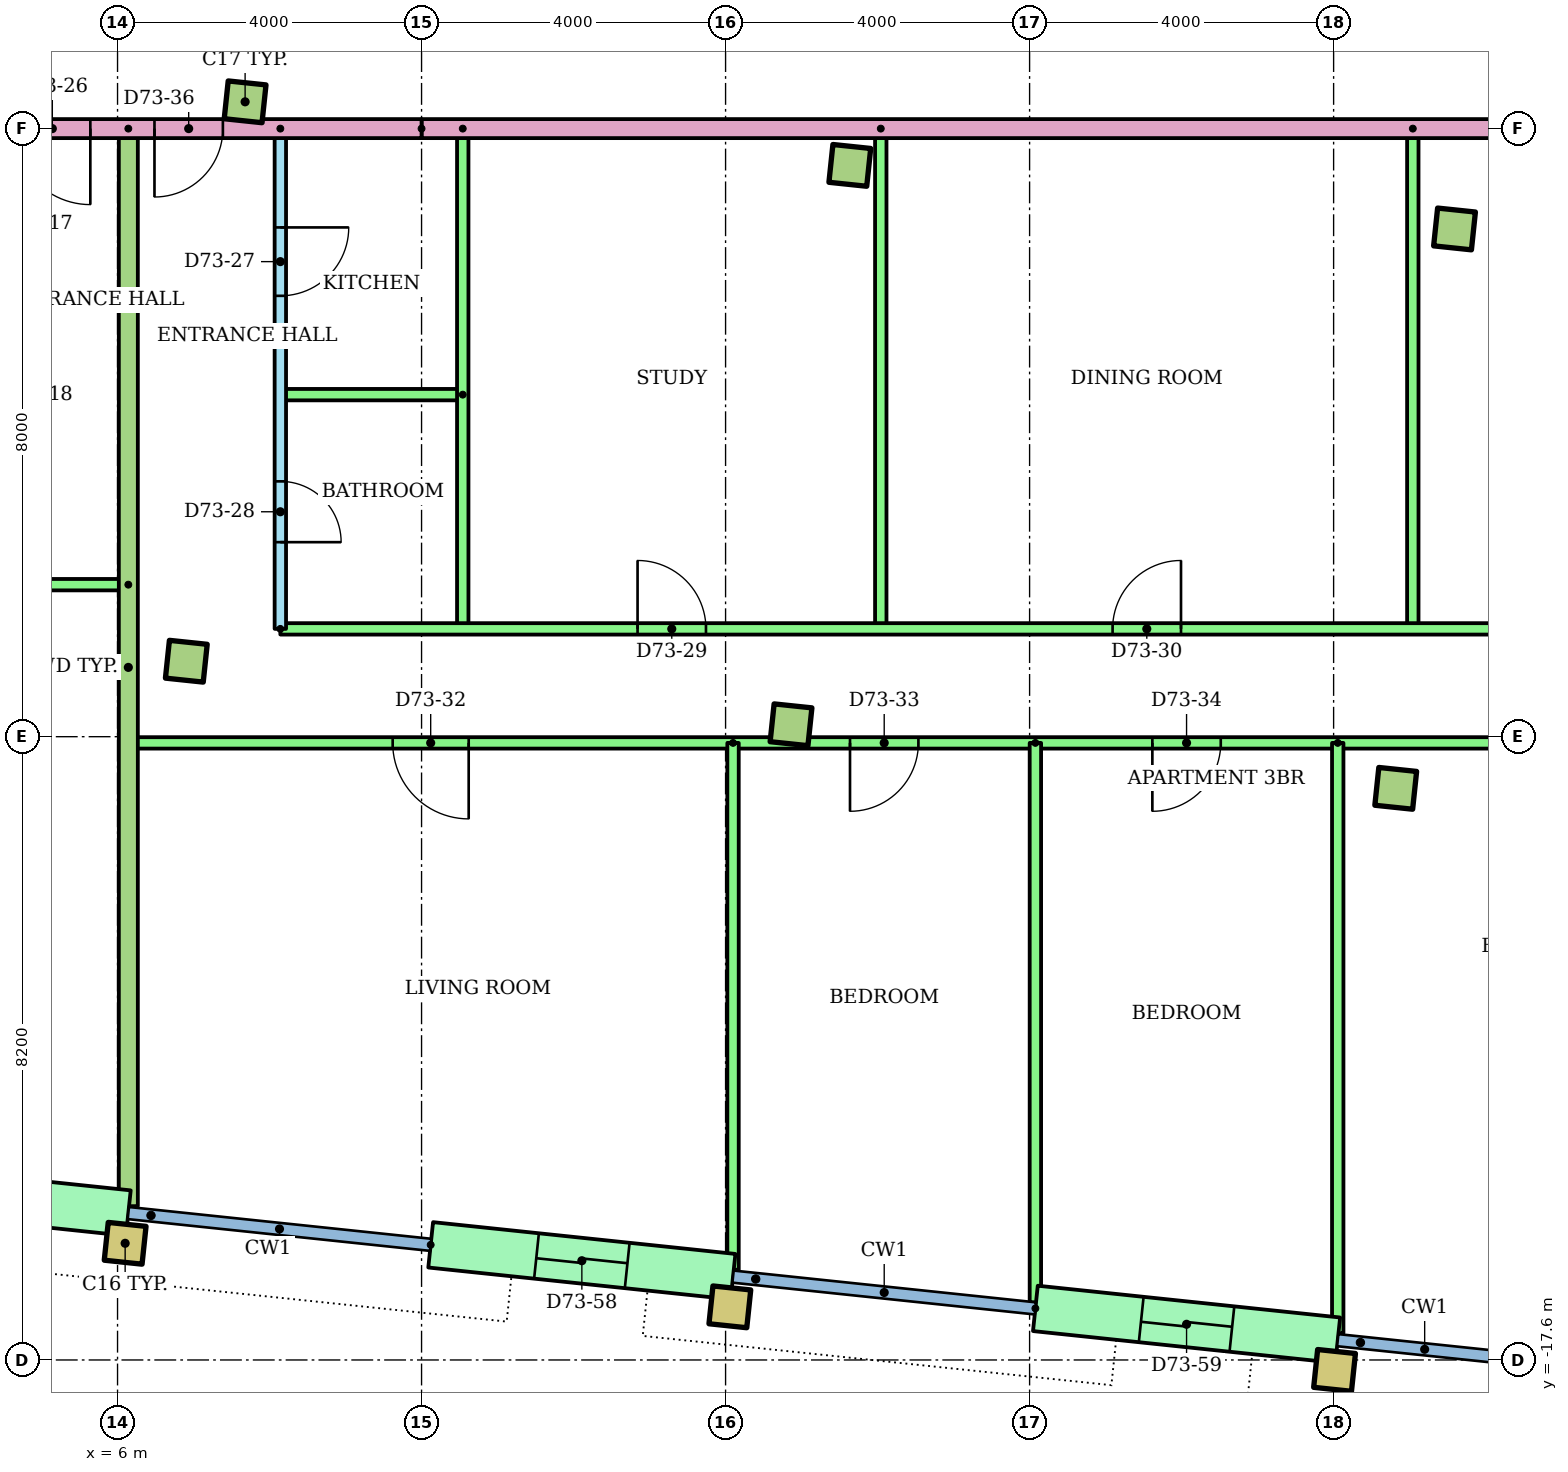
"""IFC4 building model, lengths in metres.
Left out: names, types, materials, properties, quantities, classifications, styles, units other than length and angle.
Written with IfcOpenShell. Run it as: python <this file> out.ifc"""

import sys

from ifc_helpers import new_model, si_unit, direction, frame, frame_2d, origin, origin_2d, place, context, subcontext, project, spatial, rectangle, hollow_rectangle, extrude, element, fill, save


model = new_model("IFC4")
c1 = context("Model", 3, precision=1e-05, world=origin(), true_north=direction((0.0, 1.0)))
c2 = subcontext(c1, "Body", "Model", "MODEL_VIEW")
j1 = project(units=[si_unit("LENGTHUNIT", "METRE"), si_unit("PLANEANGLEUNIT", "RADIAN")], contexts=[c1])
p1 = place(None, origin())
s1 = spatial("IfcSite", under=j1, at=p1, CompositionType="ELEMENT")
p2 = place(p1, origin())
s2 = spatial("IfcBuilding", under=s1, at=p2, CompositionType="ELEMENT")
p3 = place(p2, frame((0.0, 0.0, 278.7)))
s3 = spatial("IfcBuildingStorey", under=s2, at=p3, CompositionType="ELEMENT", Elevation=278.7)
for number, where, z_axis, x_axis in (
    (1, (6.1, -16.065, 0.0), (0.0, 0.0, 1.0), (0.995, -0.105, 0.0)),
    (2, (14.056, -16.901, 0.0), (0.0, 0.0, 1.0), (0.995, -0.105, 0.0)),
    (3, (22.012, -17.737, 0.0), (0.0, 0.0, 1.0), (0.995, -0.105, 0.0)),
):
    element("IfcColumn", number, at=place(p3, frame(where, z_axis=z_axis, x_axis=x_axis)), inside=s3, PredefinedType="COLUMN", context=c2, shape_type="SweptSolid", body=[
        extrude(hollow_rectangle(XDim=0.5, YDim=0.5, WallThickness=0.025, at=origin_2d()), origin(), (0.0, 0.0, 1.0), 3.2),
    ])
for number, where, z_axis, x_axis in (
    (4, (6.905, -8.407, 0.0), (0.0, 0.0, 1.0), (0.995, -0.105, 0.0)),
    (5, (14.861, -9.243, 0.0), (0.0, 0.0, 1.0), (0.995, -0.105, 0.0)),
    (6, (22.817, -10.08, 0.0), (0.0, 0.0, 1.0), (0.995, -0.105, 0.0)),
    (7, (7.678, -1.048, 0.0), (0.0, 0.0, 1.0), (0.995, -0.105, 0.0)),
    (8, (15.635, -1.884, 0.0), (0.0, 0.0, 1.0), (0.995, -0.105, 0.0)),
    (9, (23.591, -2.72, 0.0), (0.0, 0.0, 1.0), (0.995, -0.105, 0.0)),
):
    element("IfcColumn", number, at=place(p3, frame(where, z_axis=z_axis, x_axis=x_axis)), inside=s3, PredefinedType="COLUMN", context=c2, shape_type="SweptSolid", body=[
        extrude(rectangle(XDim=0.5, YDim=0.5, at=origin_2d()), origin(), (0.0, 0.0, 1.0), 3.2),
    ])
p4 = place(p3, frame((2.164, -15.249, 0.0), z_axis=(0.0, 0.0, 1.0), x_axis=(0.99452550138, -0.104494148666, 0.0)))
e10 = element("IfcWall", 10, at=p4, inside=s3, PredefinedType="STANDARD", context=c2, shape_type="SweptSolid", body=[
    extrude(rectangle(XDim=4.0, YDim=0.6, at=frame_2d((2.0, 0.0))), origin(), (0.0, 0.0, 1.0), 2.8),
])
p5 = place(p4, frame((1.4, 0.0, 0.0)))
e11 = element("IfcOpeningElement", 11, at=p5, cuts=e10, PredefinedType="OPENING", context=c2, shape_type="SweptSolid", body=[
    extrude(rectangle(XDim=1.2, YDim=2.1, at=frame_2d((0.6, 1.05))), frame((0.0, 0.31, 0.0), z_axis=(0.0, -1.0, 0.0), x_axis=(1.0, 0.0, 0.0)), (0.0, 0.0, 1.0), 0.62),
])
p6 = place(p3, frame((10.12, -16.085, 0.0), z_axis=(0.0, 0.0, 1.0), x_axis=(0.994519156568, -0.104554517933, 0.0)))
e12 = element("IfcWall", 12, at=p6, inside=s3, PredefinedType="STANDARD", context=c2, shape_type="SweptSolid", body=[
    extrude(rectangle(XDim=4.0, YDim=0.6, at=frame_2d((2.0, 0.0))), origin(), (0.0, 0.0, 1.0), 2.8),
])
p7 = place(p6, frame((1.4, 0.0, 0.0)))
e13 = element("IfcOpeningElement", 13, at=p7, cuts=e12, PredefinedType="OPENING", context=c2, shape_type="SweptSolid", body=[
    extrude(rectangle(XDim=1.2, YDim=2.1, at=frame_2d((0.6, 1.05))), frame((0.0, 0.31, 0.0), z_axis=(0.0, -1.0, 0.0), x_axis=(1.0, 0.0, 0.0)), (0.0, 0.0, 1.0), 0.62),
])
p8 = place(p3, frame((18.076, -16.921, 0.0), z_axis=(0.0, 0.0, 1.0), x_axis=(0.994519156568, -0.104554517933, 0.0)))
e14 = element("IfcWall", 14, at=p8, inside=s3, PredefinedType="STANDARD", context=c2, shape_type="SweptSolid", body=[
    extrude(rectangle(XDim=4.0, YDim=0.6, at=frame_2d((2.0, 0.0))), origin(), (0.0, 0.0, 1.0), 2.8),
])
p9 = place(p8, frame((1.4, 0.0, 0.0)))
e15 = element("IfcOpeningElement", 15, at=p9, cuts=e14, PredefinedType="OPENING", context=c2, shape_type="SweptSolid", body=[
    extrude(rectangle(XDim=1.2, YDim=2.1, at=frame_2d((0.6, 1.05))), frame((0.0, 0.31, 0.0), z_axis=(0.0, -1.0, 0.0), x_axis=(1.0, 0.0, 0.0)), (0.0, 0.0, 1.0), 0.62),
])
p10 = place(p3, frame((6.142, -7.4, 0.0), z_axis=(0.0, 0.0, 1.0), x_axis=(-1.0, 0.0, 0.0)))
e16 = element("IfcWall", 16, at=p10, inside=s3, PredefinedType="PARTITIONING", context=c2, shape_type="SweptSolid", body=[
    extrude(rectangle(XDim=15.912, YDim=0.15, at=frame_2d((7.956, 0.0))), origin(), (0.0, 0.0, 1.0), 2.4),
])
p11 = place(p10, frame((12.252, 0.0, 0.0)))
e17 = element("IfcOpeningElement", 17, at=p11, cuts=e16, PredefinedType="OPENING", context=c2, shape_type="SweptSolid", body=[
    extrude(rectangle(XDim=0.9, YDim=2.1, at=frame_2d((0.45, 1.05))), frame((0.0, 0.085, 0.0), z_axis=(0.0, -1.0, 0.0), x_axis=(1.0, 0.0, 0.0)), (0.0, 0.0, 1.0), 0.17),
])
p12 = place(p10, frame((9.495, 0.0, 0.0)))
e18 = element("IfcOpeningElement", 18, at=p12, cuts=e16, PredefinedType="OPENING", context=c2, shape_type="SweptSolid", body=[
    extrude(rectangle(XDim=0.9, YDim=2.1, at=frame_2d((0.45, 1.05))), frame((0.0, 0.085, 0.0), z_axis=(0.0, -1.0, 0.0), x_axis=(1.0, 0.0, 0.0)), (0.0, 0.0, 1.0), 0.17),
])
p13 = place(p10, frame((3.478, 0.0, 0.0)))
e19 = element("IfcOpeningElement", 19, at=p13, cuts=e16, PredefinedType="OPENING", context=c2, shape_type="SweptSolid", body=[
    extrude(rectangle(XDim=1.0, YDim=2.1, at=frame_2d((0.5, 1.05))), frame((0.0, 0.085, 0.0), z_axis=(0.0, -1.0, 0.0), x_axis=(1.0, 0.0, 0.0)), (0.0, 0.0, 1.0), 0.17),
])
p14 = place(p3, frame((8.142, -1.4, 0.0), z_axis=(0.0, 0.0, 1.0), x_axis=(0.0, -1.0, 0.0)))
e20 = element("IfcWall", 20, at=p14, inside=s3, PredefinedType="PARTITIONING", context=c2, shape_type="SweptSolid", body=[
    extrude(rectangle(XDim=6.582, YDim=0.15, at=frame_2d((3.291, 0.0))), origin(), (0.0, 0.0, 1.0), 2.4),
])
p15 = place(p14, frame((1.3, 0.0, 0.0)))
e21 = element("IfcOpeningElement", 21, at=p15, cuts=e20, PredefinedType="OPENING", context=c2, shape_type="SweptSolid", body=[
    extrude(rectangle(XDim=0.9, YDim=2.1, at=frame_2d((0.45, 1.05))), frame((0.0, 0.085, 0.0), z_axis=(0.0, -1.0, 0.0), x_axis=(1.0, 0.0, 0.0)), (0.0, 0.0, 1.0), 0.17),
])
p16 = place(p14, frame((4.641, 0.0, 0.0)))
e22 = element("IfcOpeningElement", 22, at=p16, cuts=e20, PredefinedType="OPENING", context=c2, shape_type="SweptSolid", body=[
    extrude(rectangle(XDim=0.8, YDim=2.1, at=frame_2d((0.4, 1.05))), frame((0.0, 0.085, 0.0), z_axis=(0.0, -1.0, 0.0), x_axis=(1.0, 0.0, 0.0)), (0.0, 0.0, 1.0), 0.17),
])
p17 = place(p3, frame((10.542, -4.9, 0.0), z_axis=(0.0, 0.0, 1.0), x_axis=(-1.0, 0.0, 0.0)))
e23 = element("IfcWall", 23, at=p17, inside=s3, PredefinedType="PARTITIONING", context=c2, shape_type="SweptSolid", body=[
    extrude(rectangle(XDim=2.4, YDim=0.15, at=frame_2d((1.2, 0.0))), origin(), (0.0, 0.0, 1.0), 2.4),
])
for number, where, z_axis, x_axis in (
    (24, (10.542, -1.4, 0.0), (0.0, 0.0, 1.0), (0.0, -1.0, 0.0)),
    (25, (16.042, -1.4, 0.0), (0.0, 0.0, 1.0), (0.0, -1.0, 0.0)),
    (26, (23.042, -1.4, 0.0), (0.0, 0.0, 1.0), (0.0, -1.0, 0.0)),
):
    element("IfcWall", number, at=place(p3, frame(where, z_axis=z_axis, x_axis=x_axis)), inside=s3, PredefinedType="PARTITIONING", context=c2, shape_type="SweptSolid", body=[
        extrude(rectangle(XDim=6.582, YDim=0.15, at=frame_2d((3.291, 0.0))), origin(), (0.0, 0.0, 1.0), 2.4),
    ])
p18 = place(p3, frame((8.142, -7.982, 0.0)))
e27 = element("IfcWall", 27, at=p18, inside=s3, PredefinedType="PARTITIONING", context=c2, shape_type="SweptSolid", body=[
    extrude(rectangle(XDim=21.955, YDim=0.15, at=frame_2d((10.978, 0.0))), origin(), (0.0, 0.0, 1.0), 2.4),
])
p19 = place(p18, frame((4.7, 0.0, 0.0)))
e28 = element("IfcOpeningElement", 28, at=p19, cuts=e27, PredefinedType="OPENING", context=c2, shape_type="SweptSolid", body=[
    extrude(rectangle(XDim=0.9, YDim=2.1, at=frame_2d((0.45, 1.05))), frame((0.0, 0.085, 0.0), z_axis=(0.0, -1.0, 0.0), x_axis=(1.0, 0.0, 0.0)), (0.0, 0.0, 1.0), 0.17),
])
p20 = place(p18, frame((10.95, 0.0, 0.0)))
e29 = element("IfcOpeningElement", 29, at=p20, cuts=e27, PredefinedType="OPENING", context=c2, shape_type="SweptSolid", body=[
    extrude(rectangle(XDim=0.9, YDim=2.1, at=frame_2d((0.45, 1.05))), frame((0.0, 0.085, 0.0), z_axis=(0.0, -1.0, 0.0), x_axis=(1.0, 0.0, 0.0)), (0.0, 0.0, 1.0), 0.17),
])
p21 = place(p18, frame((18.958, 0.0, 0.0)))
e30 = element("IfcOpeningElement", 30, at=p21, cuts=e27, PredefinedType="OPENING", context=c2, shape_type="SweptSolid", body=[
    extrude(rectangle(XDim=0.9, YDim=2.1, at=frame_2d((0.45, 1.05))), frame((0.0, 0.085, 0.0), z_axis=(0.0, -1.0, 0.0), x_axis=(1.0, 0.0, 0.0)), (0.0, 0.0, 1.0), 0.17),
])
p22 = place(p3, frame((29.94, -9.482, 0.0), z_axis=(0.0, 0.0, 1.0), x_axis=(-1.0, 0.0, 0.0)))
e31 = element("IfcWall", 31, at=p22, inside=s3, PredefinedType="PARTITIONING", context=c2, shape_type="SweptSolid", body=[
    extrude(rectangle(XDim=23.798, YDim=0.15, at=frame_2d((11.899, 0.0))), origin(), (0.0, 0.0, 1.0), 2.4),
])
p23 = place(p22, frame((19.32, 0.0, 0.0)))
e32 = element("IfcOpeningElement", 32, at=p23, cuts=e31, PredefinedType="OPENING", context=c2, shape_type="SweptSolid", body=[
    extrude(rectangle(XDim=1.0, YDim=2.1, at=frame_2d((0.5, 1.05))), frame((0.0, 0.085, 0.0), z_axis=(0.0, -1.0, 0.0), x_axis=(1.0, 0.0, 0.0)), (0.0, 0.0, 1.0), 0.17),
])
p24 = place(p22, frame((13.403, 0.0, 0.0)))
e33 = element("IfcOpeningElement", 33, at=p24, cuts=e31, PredefinedType="OPENING", context=c2, shape_type="SweptSolid", body=[
    extrude(rectangle(XDim=0.9, YDim=2.1, at=frame_2d((0.45, 1.05))), frame((0.0, 0.085, 0.0), z_axis=(0.0, -1.0, 0.0), x_axis=(1.0, 0.0, 0.0)), (0.0, 0.0, 1.0), 0.17),
])
p25 = place(p22, frame((9.425, 0.0, 0.0)))
e34 = element("IfcOpeningElement", 34, at=p25, cuts=e31, PredefinedType="OPENING", context=c2, shape_type="SweptSolid", body=[
    extrude(rectangle(XDim=0.9, YDim=2.1, at=frame_2d((0.45, 1.05))), frame((0.0, 0.085, 0.0), z_axis=(0.0, -1.0, 0.0), x_axis=(1.0, 0.0, 0.0)), (0.0, 0.0, 1.0), 0.17),
])
p26 = place(p22, frame((2.434, 0.0, 0.0)))
e35 = element("IfcOpeningElement", 35, at=p26, cuts=e31, PredefinedType="OPENING", context=c2, shape_type="SweptSolid", body=[
    extrude(rectangle(XDim=0.9, YDim=2.1, at=frame_2d((0.45, 1.05))), frame((0.0, 0.085, 0.0), z_axis=(0.0, -1.0, 0.0), x_axis=(1.0, 0.0, 0.0)), (0.0, 0.0, 1.0), 0.17),
])
p27 = place(p3, frame((14.098, -9.482, 0.0), z_axis=(0.0, 0.0, 1.0), x_axis=(0.0, -1.0, 0.0)))
e36 = element("IfcWall", 36, at=p27, inside=s3, PredefinedType="PARTITIONING", context=c2, shape_type="SweptSolid", body=[
    extrude(rectangle(XDim=6.931, YDim=0.15, at=frame_2d((3.466, 0.0))), origin(), (0.0, 0.0, 1.0), 2.4),
])
p28 = place(p3, frame((18.076, -9.482, 0.0), z_axis=(0.0, 0.0, 1.0), x_axis=(0.0, -1.0, 0.0)))
e37 = element("IfcWall", 37, at=p28, inside=s3, PredefinedType="PARTITIONING", context=c2, shape_type="SweptSolid", body=[
    extrude(rectangle(XDim=7.36, YDim=0.15, at=frame_2d((3.68, 0.0))), origin(), (0.0, 0.0, 1.0), 2.4),
])
p29 = place(p3, frame((22.054, -9.482, 0.0), z_axis=(0.0, 0.0, 1.0), x_axis=(0.0, -1.0, 0.0)))
e38 = element("IfcWall", 38, at=p29, inside=s3, PredefinedType="PARTITIONING", context=c2, shape_type="SweptSolid", body=[
    extrude(rectangle(XDim=7.767, YDim=0.15, at=frame_2d((3.884, 0.0))), origin(), (0.0, 0.0, 1.0), 2.4),
])
p30 = place(p3, frame((6.142, -1.4, 0.0), z_axis=(0.0, 0.0, 1.0), x_axis=(0.0, -1.0, 0.0)))
e39 = element("IfcWall", 39, at=p30, inside=s3, PredefinedType="PARTITIONING", context=c2, shape_type="SweptSolid", body=[
    extrude(rectangle(XDim=14.177, YDim=0.25, at=frame_2d((7.088, 0.0))), origin(), (0.0, 0.0, 1.0), 2.4),
])
p31 = place(p3, frame((25.0, -1.4, 0.0), z_axis=(0.0, 0.0, 1.0), x_axis=(-1.0, 0.0, 0.0)))
e40 = element("IfcWall", 40, at=p31, inside=s3, PredefinedType="PARTITIONING", context=c2, shape_type="SweptSolid", body=[
    extrude(rectangle(XDim=15.0, YDim=0.25, at=frame_2d((7.5, 0.0))), origin(), (0.0, 0.0, 1.0), 2.4),
])
p32 = place(p3, frame((10.0, -1.4, 0.0), z_axis=(0.0, 0.0, 1.0), x_axis=(-1.0, 0.0, 0.0)))
e41 = element("IfcWall", 41, at=p32, inside=s3, PredefinedType="PARTITIONING", context=c2, shape_type="SweptSolid", body=[
    extrude(rectangle(XDim=20.0, YDim=0.25, at=frame_2d((10.0, 0.0))), origin(), (0.0, 0.0, 1.0), 2.4),
])
p33 = place(p32, frame((4.358, 0.0, 0.0)))
e42 = element("IfcOpeningElement", 42, at=p33, cuts=e41, PredefinedType="OPENING", context=c2, shape_type="SweptSolid", body=[
    extrude(rectangle(XDim=1.0, YDim=2.1, at=frame_2d((0.5, 1.05))), frame((0.0, 0.135, 0.0), z_axis=(0.0, -1.0, 0.0), x_axis=(1.0, 0.0, 0.0)), (0.0, 0.0, 1.0), 0.27),
])
p34 = place(p32, frame((2.614, 0.0, 0.0)))
e43 = element("IfcOpeningElement", 43, at=p34, cuts=e41, PredefinedType="OPENING", context=c2, shape_type="SweptSolid", body=[
    extrude(rectangle(XDim=0.9, YDim=2.1, at=frame_2d((0.45, 1.05))), frame((0.0, 0.135, 0.0), z_axis=(0.0, -1.0, 0.0), x_axis=(1.0, 0.0, 0.0)), (0.0, 0.0, 1.0), 0.27),
])
p35 = place(p33, origin())
e44 = element("IfcDoor", 44, at=p35, inside=s3, OperationType="SINGLE_SWING_LEFT", PredefinedType="DOOR", context=c2, shape_type="SweptSolid", body=[
    extrude(rectangle(XDim=1.0, YDim=2.1, at=frame_2d((0.5, 1.05))), frame((0.0, 0.025, 0.0), z_axis=(0.0, -1.0, 0.0), x_axis=(1.0, 0.0, 0.0)), (0.0, 0.0, 1.0), 0.05),
])
fill(e42, e44)
p36 = place(p15, origin())
e45 = element("IfcDoor", 45, at=p36, inside=s3, OperationType="SINGLE_SWING_LEFT", PredefinedType="DOOR", context=c2, shape_type="SweptSolid", body=[
    extrude(rectangle(XDim=0.9, YDim=2.1, at=frame_2d((0.45, 1.05))), frame((0.0, 0.025, 0.0), z_axis=(0.0, -1.0, 0.0), x_axis=(1.0, 0.0, 0.0)), (0.0, 0.0, 1.0), 0.05),
])
fill(e21, e45)
p37 = place(p16, origin())
e46 = element("IfcDoor", 46, at=p37, inside=s3, OperationType="SINGLE_SWING_RIGHT", PredefinedType="DOOR", context=c2, shape_type="SweptSolid", body=[
    extrude(rectangle(XDim=0.8, YDim=2.1, at=frame_2d((0.4, 1.05))), frame((0.0, 0.025, 0.0), z_axis=(0.0, -1.0, 0.0), x_axis=(1.0, 0.0, 0.0)), (0.0, 0.0, 1.0), 0.05),
])
fill(e22, e46)
p38 = place(p19, origin())
e47 = element("IfcDoor", 47, at=p38, inside=s3, OperationType="SINGLE_SWING_LEFT", PredefinedType="DOOR", context=c2, shape_type="SweptSolid", body=[
    extrude(rectangle(XDim=0.9, YDim=2.1, at=frame_2d((0.45, 1.05))), frame((0.0, 0.025, 0.0), z_axis=(0.0, -1.0, 0.0), x_axis=(1.0, 0.0, 0.0)), (0.0, 0.0, 1.0), 0.05),
])
fill(e28, e47)
p39 = place(p20, origin())
e48 = element("IfcDoor", 48, at=p39, inside=s3, OperationType="SINGLE_SWING_RIGHT", PredefinedType="DOOR", context=c2, shape_type="SweptSolid", body=[
    extrude(rectangle(XDim=0.9, YDim=2.1, at=frame_2d((0.45, 1.05))), frame((0.0, 0.025, 0.0), z_axis=(0.0, -1.0, 0.0), x_axis=(1.0, 0.0, 0.0)), (0.0, 0.0, 1.0), 0.05),
])
fill(e29, e48)
p40 = place(p23, origin())
e49 = element("IfcDoor", 49, at=p40, inside=s3, OperationType="SINGLE_SWING_LEFT", PredefinedType="DOOR", context=c2, shape_type="SweptSolid", body=[
    extrude(rectangle(XDim=1.0, YDim=2.1, at=frame_2d((0.5, 1.05))), frame((0.0, 0.025, 0.0), z_axis=(0.0, -1.0, 0.0), x_axis=(1.0, 0.0, 0.0)), (0.0, 0.0, 1.0), 0.05),
])
fill(e32, e49)
p41 = place(p24, origin())
e50 = element("IfcDoor", 50, at=p41, inside=s3, OperationType="SINGLE_SWING_RIGHT", PredefinedType="DOOR", context=c2, shape_type="SweptSolid", body=[
    extrude(rectangle(XDim=0.9, YDim=2.1, at=frame_2d((0.45, 1.05))), frame((0.0, 0.025, 0.0), z_axis=(0.0, -1.0, 0.0), x_axis=(1.0, 0.0, 0.0)), (0.0, 0.0, 1.0), 0.05),
])
fill(e33, e50)
p42 = place(p25, origin())
e51 = element("IfcDoor", 51, at=p42, inside=s3, OperationType="SINGLE_SWING_RIGHT", PredefinedType="DOOR", context=c2, shape_type="SweptSolid", body=[
    extrude(rectangle(XDim=0.9, YDim=2.1, at=frame_2d((0.45, 1.05))), frame((0.0, 0.025, 0.0), z_axis=(0.0, -1.0, 0.0), x_axis=(1.0, 0.0, 0.0)), (0.0, 0.0, 1.0), 0.05),
])
fill(e34, e51)
p43 = place(p34, origin())
e52 = element("IfcDoor", 52, at=p43, inside=s3, OperationType="SINGLE_SWING_RIGHT", PredefinedType="DOOR", context=c2, shape_type="SweptSolid", body=[
    extrude(rectangle(XDim=0.9, YDim=2.1, at=frame_2d((0.45, 1.05))), frame((0.0, 0.025, 0.0), z_axis=(0.0, -1.0, 0.0), x_axis=(1.0, 0.0, 0.0)), (0.0, 0.0, 1.0), 0.05),
])
fill(e43, e52)
p44 = place(p7, origin())
e53 = element("IfcDoor", 53, at=p44, inside=s3, OperationType="SLIDING_TO_LEFT", PredefinedType="DOOR", context=c2, shape_type="SweptSolid", body=[
    extrude(rectangle(XDim=1.2, YDim=2.1, at=frame_2d((0.6, 1.05))), frame((0.0, 0.025, 0.0), z_axis=(0.0, -1.0, 0.0), x_axis=(1.0, 0.0, 0.0)), (0.0, 0.0, 1.0), 0.05),
])
fill(e13, e53)
p45 = place(p9, origin())
e54 = element("IfcDoor", 54, at=p45, inside=s3, OperationType="SLIDING_TO_LEFT", PredefinedType="DOOR", context=c2, shape_type="SweptSolid", body=[
    extrude(rectangle(XDim=1.2, YDim=2.1, at=frame_2d((0.6, 1.05))), frame((0.0, 0.025, 0.0), z_axis=(0.0, -1.0, 0.0), x_axis=(1.0, 0.0, 0.0)), (0.0, 0.0, 1.0), 0.05),
])
fill(e15, e54)
save(model, sys.argv[1])
